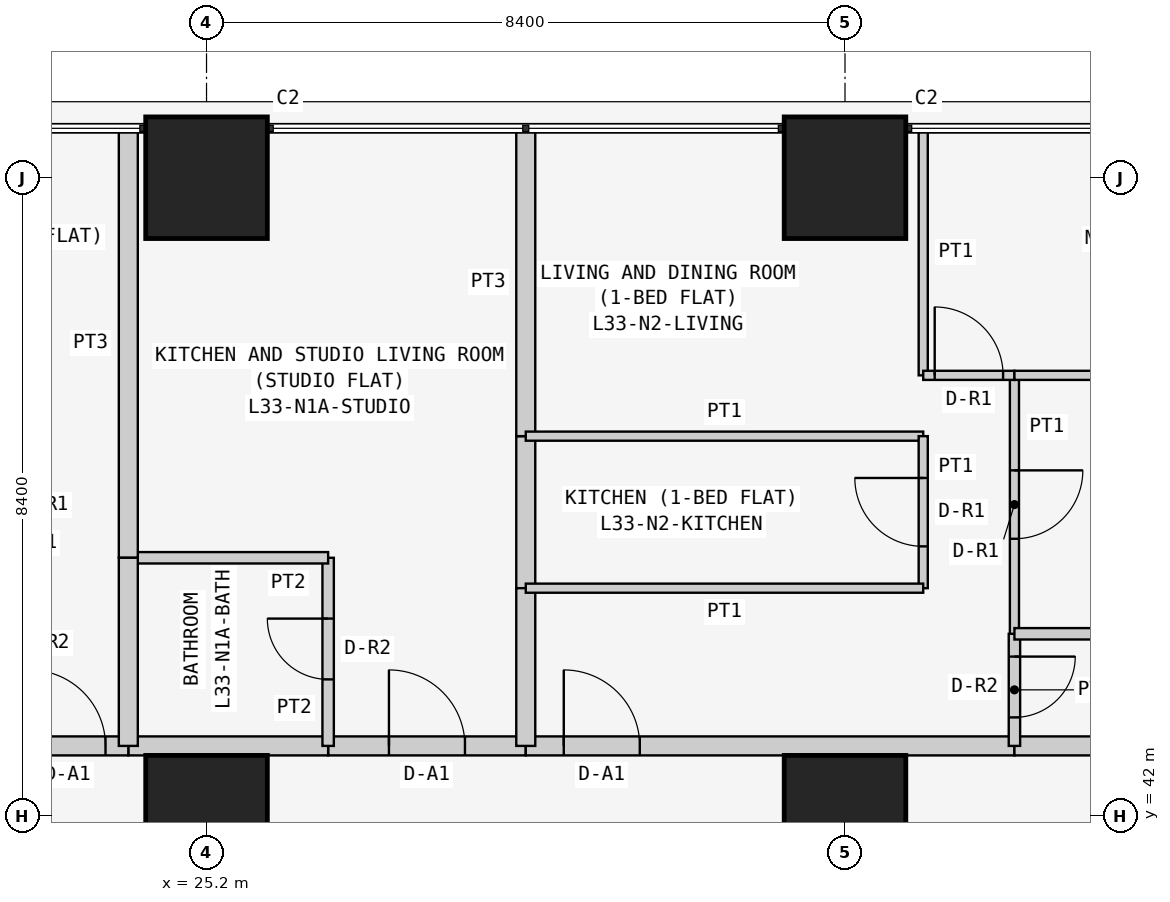
"""IFC4 building model, lengths in metres.
Left out: names, types, materials, properties, quantities, classifications, styles, units other than length and angle.
Written with IfcOpenShell. Run it as: python <this file> out.ifc"""

import sys

from ifc_helpers import new_model, si_unit, direction, frame, frame_2d, origin, origin_2d, place, context, subcontext, project, spatial, rectangle, extrude, element, fill, save


model = new_model("IFC4")
c1 = context("Model", 3, precision=1e-05, world=origin(), true_north=direction((0.0, 1.0)))
c2 = subcontext(c1, "Body", "Model", "MODEL_VIEW")
j1 = project(units=[si_unit("LENGTHUNIT", "METRE"), si_unit("PLANEANGLEUNIT", "RADIAN")], contexts=[c1])
p1 = place(None, origin())
s1 = spatial("IfcSite", under=j1, at=p1, CompositionType="ELEMENT")
p2 = place(p1, origin())
s2 = spatial("IfcBuilding", under=s1, at=p2, CompositionType="ELEMENT")
p3 = place(p2, frame((0.0, 0.0, 130.5)))
s3 = spatial("IfcBuildingStorey", under=s2, at=p3, CompositionType="ELEMENT", Elevation=130.5)
for number, where, z_axis, x_axis in (
    (1, (25.2, 42.0, 0.0), (0.0, 0.0, 1.0), (1.0, 0.0, 0.0)),
    (2, (25.2, 50.4, 0.0), (0.0, 0.0, 1.0), (1.0, 0.0, 0.0)),
    (3, (33.6, 42.0, 0.0), (0.0, 0.0, 1.0), (1.0, 0.0, 0.0)),
    (4, (33.6, 50.4, 0.0), (0.0, 0.0, 1.0), (1.0, 0.0, 0.0)),
):
    element("IfcColumn", number, at=place(p3, frame(where, z_axis=z_axis, x_axis=x_axis)), inside=s3, PredefinedType="COLUMN", context=c2, shape_type="SweptSolid", body=[
        extrude(rectangle(XDim=1.6, YDim=1.6, at=origin_2d()), origin(), (0.0, 0.0, 1.0), 3.6),
    ])
p4 = place(p3, frame((26.8, 42.925, 0.0), z_axis=(0.0, 0.0, 1.0), x_axis=(1.0, 0.0, 0.0)))
e5 = element("IfcWall", 5, at=p4, inside=s3, PredefinedType="PARTITIONING", context=c2, shape_type="SweptSolid", body=[
    extrude(rectangle(XDim=2.6, YDim=0.25, at=frame_2d((1.3, 0.0))), origin(), (0.0, 0.0, 1.0), 3.45),
])
p5 = place(p4, frame((0.8, 0.0, 0.0)))
e6 = element("IfcOpeningElement", 6, at=p5, cuts=e5, PredefinedType="OPENING", context=c2, shape_type="SweptSolid", body=[
    extrude(rectangle(XDim=1.0, YDim=2.1, at=frame_2d((0.5, 1.05))), frame((0.0, 0.135, 0.0), z_axis=(0.0, -1.0, 0.0), x_axis=(1.0, 0.0, 0.0)), (0.0, 0.0, 1.0), 0.27),
])
p6 = place(p3, frame((24.171, 42.925, 0.0), z_axis=(0.0, 0.0, 1.0), x_axis=(1.0, 0.0, 0.0)))
e7 = element("IfcWall", 7, at=p6, inside=s3, PredefinedType="PARTITIONING", context=c2, shape_type="SweptSolid", body=[
    extrude(rectangle(XDim=2.629, YDim=0.25, at=frame_2d((1.314, 0.0))), origin(), (0.0, 0.0, 1.0), 3.45),
])
p7 = place(p3, frame((22.571, 42.925, 0.0), z_axis=(0.0, 0.0, 1.0), x_axis=(1.0, 0.0, 0.0)))
e8 = element("IfcWall", 8, at=p7, inside=s3, PredefinedType="PARTITIONING", context=c2, shape_type="SweptSolid", body=[
    extrude(rectangle(XDim=1.6, YDim=0.25, at=frame_2d((0.8, 0.0))), origin(), (0.0, 0.0, 1.0), 3.45),
])
p8 = place(p7, frame((0.3, 0.0, 0.0)))
e9 = element("IfcOpeningElement", 9, at=p8, cuts=e8, PredefinedType="OPENING", context=c2, shape_type="SweptSolid", body=[
    extrude(rectangle(XDim=1.0, YDim=2.1, at=frame_2d((0.5, 1.05))), frame((0.0, 0.135, 0.0), z_axis=(0.0, -1.0, 0.0), x_axis=(1.0, 0.0, 0.0)), (0.0, 0.0, 1.0), 0.27),
])
p9 = place(p3, frame((29.4, 42.925, 0.0), z_axis=(0.0, 0.0, 1.0), x_axis=(1.0, 0.0, 0.0)))
e10 = element("IfcWall", 10, at=p9, inside=s3, PredefinedType="PARTITIONING", context=c2, shape_type="SweptSolid", body=[
    extrude(rectangle(XDim=6.429, YDim=0.25, at=frame_2d((3.215, 0.0))), origin(), (0.0, 0.0, 1.0), 3.45),
])
p10 = place(p9, frame((0.5, 0.0, 0.0)))
e11 = element("IfcOpeningElement", 11, at=p10, cuts=e10, PredefinedType="OPENING", context=c2, shape_type="SweptSolid", body=[
    extrude(rectangle(XDim=1.0, YDim=2.1, at=frame_2d((0.5, 1.05))), frame((0.0, 0.135, 0.0), z_axis=(0.0, -1.0, 0.0), x_axis=(1.0, 0.0, 0.0)), (0.0, 0.0, 1.0), 0.27),
])
p11 = place(p3, frame((35.829, 42.925, 0.0), z_axis=(0.0, 0.0, 1.0), x_axis=(1.0, 0.0, 0.0)))
e12 = element("IfcWall", 12, at=p11, inside=s3, PredefinedType="PARTITIONING", context=c2, shape_type="SweptSolid", body=[
    extrude(rectangle(XDim=6.871, YDim=0.25, at=frame_2d((3.436, 0.0))), origin(), (0.0, 0.0, 1.0), 3.45),
])
p12 = place(p3, frame((26.8, 42.925, 0.0), z_axis=(0.0, 0.0, 1.0), x_axis=(0.0, 1.0, 0.0)))
e13 = element("IfcWall", 13, at=p12, inside=s3, PredefinedType="PARTITIONING", context=c2, shape_type="SweptSolid", body=[
    extrude(rectangle(XDim=2.475, YDim=0.15, at=frame_2d((1.237, 0.0))), origin(), (0.0, 0.0, 1.0), 3.45),
])
p13 = place(p12, frame((0.875, 0.0, 0.0)))
e14 = element("IfcOpeningElement", 14, at=p13, cuts=e13, PredefinedType="OPENING", context=c2, shape_type="SweptSolid", body=[
    extrude(rectangle(XDim=0.8, YDim=2.1, at=frame_2d((0.4, 1.05))), frame((0.0, 0.085, 0.0), z_axis=(0.0, -1.0, 0.0), x_axis=(1.0, 0.0, 0.0)), (0.0, 0.0, 1.0), 0.17),
])
p14 = place(p3, frame((26.8, 45.4, 0.0), z_axis=(0.0, 0.0, 1.0), x_axis=(-1.0, 0.0, 0.0)))
e15 = element("IfcWall", 15, at=p14, inside=s3, PredefinedType="PARTITIONING", context=c2, shape_type="SweptSolid", body=[
    extrude(rectangle(XDim=2.629, YDim=0.15, at=frame_2d((1.314, 0.0))), origin(), (0.0, 0.0, 1.0), 3.45),
])
p15 = place(p3, frame((24.171, 45.4, 0.0), z_axis=(0.0, 0.0, 1.0), x_axis=(0.0, 1.0, 0.0)))
e16 = element("IfcWall", 16, at=p15, inside=s3, PredefinedType="PARTITIONING", context=c2, shape_type="SweptSolid", body=[
    extrude(rectangle(XDim=5.65, YDim=0.25, at=frame_2d((2.825, 0.0))), origin(), (0.0, 0.0, 1.0), 3.45),
])
p16 = place(p3, frame((29.4, 47.0, 0.0), z_axis=(0.0, 0.0, 1.0), x_axis=(0.0, -1.0, 0.0)))
e17 = element("IfcWall", 17, at=p16, inside=s3, PredefinedType="PARTITIONING", context=c2, shape_type="SweptSolid", body=[
    extrude(rectangle(XDim=2.0, YDim=0.25, at=frame_2d((1.0, 0.0))), origin(), (0.0, 0.0, 1.0), 2.848),
])
p17 = place(p3, frame((29.4, 45.0, 0.0), z_axis=(0.0, 0.0, 1.0), x_axis=(0.0, -1.0, 0.0)))
e18 = element("IfcWall", 18, at=p17, inside=s3, PredefinedType="PARTITIONING", context=c2, shape_type="SweptSolid", body=[
    extrude(rectangle(XDim=2.075, YDim=0.25, at=frame_2d((1.038, 0.0))), origin(), (0.0, 0.0, 1.0), 2.848),
])
p18 = place(p3, frame((29.4, 51.05, 0.0), z_axis=(0.0, 0.0, 1.0), x_axis=(0.0, -1.0, 0.0)))
e19 = element("IfcWall", 19, at=p18, inside=s3, PredefinedType="PARTITIONING", context=c2, shape_type="SweptSolid", body=[
    extrude(rectangle(XDim=4.05, YDim=0.25, at=frame_2d((2.025, 0.0))), origin(), (0.0, 0.0, 1.0), 2.848),
])
p19 = place(p3, frame((24.171, 45.4, 0.0), z_axis=(0.0, 0.0, 1.0), x_axis=(0.0, -1.0, 0.0)))
e20 = element("IfcWall", 20, at=p19, inside=s3, PredefinedType="PARTITIONING", context=c2, shape_type="SweptSolid", body=[
    extrude(rectangle(XDim=2.475, YDim=0.25, at=frame_2d((1.237, 0.0))), origin(), (0.0, 0.0, 1.0), 3.45),
])
p20 = place(p3, frame((29.4, 47.0, 0.0), z_axis=(0.0, 0.0, 1.0), x_axis=(1.0, 0.0, 0.0)))
e21 = element("IfcWall", 21, at=p20, inside=s3, PredefinedType="PARTITIONING", context=c2, shape_type="SweptSolid", body=[
    extrude(rectangle(XDim=5.229, YDim=0.12, at=frame_2d((2.615, 0.0))), origin(), (0.0, 0.0, 1.0), 3.45),
])
p21 = place(p3, frame((34.629, 47.0, 0.0), z_axis=(0.0, 0.0, 1.0), x_axis=(0.0, -1.0, 0.0)))
e22 = element("IfcWall", 22, at=p21, inside=s3, PredefinedType="PARTITIONING", context=c2, shape_type="SweptSolid", body=[
    extrude(rectangle(XDim=2.0, YDim=0.12, at=frame_2d((1.0, 0.0))), origin(), (0.0, 0.0, 1.0), 3.45),
])
p22 = place(p21, frame((0.55, 0.0, 0.0)))
e23 = element("IfcOpeningElement", 23, at=p22, cuts=e22, PredefinedType="OPENING", context=c2, shape_type="SweptSolid", body=[
    extrude(rectangle(XDim=0.9, YDim=2.1, at=frame_2d((0.45, 1.05))), frame((0.0, 0.07, 0.0), z_axis=(0.0, -1.0, 0.0), x_axis=(1.0, 0.0, 0.0)), (0.0, 0.0, 1.0), 0.14),
])
p23 = place(p3, frame((34.629, 45.0, 0.0), z_axis=(0.0, 0.0, 1.0), x_axis=(-1.0, 0.0, 0.0)))
e24 = element("IfcWall", 24, at=p23, inside=s3, PredefinedType="PARTITIONING", context=c2, shape_type="SweptSolid", body=[
    extrude(rectangle(XDim=5.229, YDim=0.12, at=frame_2d((2.615, 0.0))), origin(), (0.0, 0.0, 1.0), 3.45),
])
p24 = place(p3, frame((35.829, 44.4, 0.0), z_axis=(0.0, 0.0, 1.0), x_axis=(0.0, -1.0, 0.0)))
e25 = element("IfcWall", 25, at=p24, inside=s3, PredefinedType="PARTITIONING", context=c2, shape_type="SweptSolid", body=[
    extrude(rectangle(XDim=1.475, YDim=0.15, at=frame_2d((0.737, 0.0))), origin(), (0.0, 0.0, 1.0), 3.45),
])
p25 = place(p24, frame((0.3, 0.0, 0.0)))
e26 = element("IfcOpeningElement", 26, at=p25, cuts=e25, PredefinedType="OPENING", context=c2, shape_type="SweptSolid", body=[
    extrude(rectangle(XDim=0.8, YDim=2.1, at=frame_2d((0.4, 1.05))), frame((0.0, 0.085, 0.0), z_axis=(0.0, -1.0, 0.0), x_axis=(1.0, 0.0, 0.0)), (0.0, 0.0, 1.0), 0.17),
])
p26 = place(p3, frame((35.829, 47.8, 0.0), z_axis=(0.0, 0.0, 1.0), x_axis=(0.0, -1.0, 0.0)))
e27 = element("IfcWall", 27, at=p26, inside=s3, PredefinedType="PARTITIONING", context=c2, shape_type="SweptSolid", body=[
    extrude(rectangle(XDim=3.4, YDim=0.12, at=frame_2d((1.7, 0.0))), origin(), (0.0, 0.0, 1.0), 3.45),
])
p27 = place(p26, frame((1.25, 0.0, 0.0)))
e28 = element("IfcOpeningElement", 28, at=p27, cuts=e27, PredefinedType="OPENING", context=c2, shape_type="SweptSolid", body=[
    extrude(rectangle(XDim=0.9, YDim=2.1, at=frame_2d((0.45, 1.05))), frame((0.0, 0.07, 0.0), z_axis=(0.0, -1.0, 0.0), x_axis=(1.0, 0.0, 0.0)), (0.0, 0.0, 1.0), 0.14),
])
p28 = place(p3, frame((34.629, 51.05, 0.0), z_axis=(0.0, 0.0, 1.0), x_axis=(0.0, -1.0, 0.0)))
e29 = element("IfcWall", 29, at=p28, inside=s3, PredefinedType="PARTITIONING", context=c2, shape_type="SweptSolid", body=[
    extrude(rectangle(XDim=3.25, YDim=0.12, at=frame_2d((1.625, 0.0))), origin(), (0.0, 0.0, 1.0), 3.45),
])
p29 = place(p3, frame((34.629, 47.8, 0.0), z_axis=(0.0, 0.0, 1.0), x_axis=(1.0, 0.0, 0.0)))
e30 = element("IfcWall", 30, at=p29, inside=s3, PredefinedType="PARTITIONING", context=c2, shape_type="SweptSolid", body=[
    extrude(rectangle(XDim=1.2, YDim=0.12, at=frame_2d((0.6, 0.0))), origin(), (0.0, 0.0, 1.0), 3.45),
])
p30 = place(p29, frame((0.151, 0.0, 0.0)))
e31 = element("IfcOpeningElement", 31, at=p30, cuts=e30, PredefinedType="OPENING", context=c2, shape_type="SweptSolid", body=[
    extrude(rectangle(XDim=0.9, YDim=2.1, at=frame_2d((0.45, 1.05))), frame((0.0, 0.07, 0.0), z_axis=(0.0, -1.0, 0.0), x_axis=(1.0, 0.0, 0.0)), (0.0, 0.0, 1.0), 0.14),
])
p31 = place(p3, frame((35.829, 44.4, 0.0), z_axis=(0.0, 0.0, 1.0), x_axis=(1.0, 0.0, 0.0)))
e32 = element("IfcWall", 32, at=p31, inside=s3, PredefinedType="PARTITIONING", context=c2, shape_type="SweptSolid", body=[
    extrude(rectangle(XDim=6.871, YDim=0.15, at=frame_2d((3.436, 0.0))), origin(), (0.0, 0.0, 1.0), 3.45),
])
p32 = place(p3, frame((35.829, 47.8, 0.0), z_axis=(0.0, 0.0, 1.0), x_axis=(1.0, 0.0, 0.0)))
e33 = element("IfcWall", 33, at=p32, inside=s3, PredefinedType="PARTITIONING", context=c2, shape_type="SweptSolid", body=[
    extrude(rectangle(XDim=6.871, YDim=0.12, at=frame_2d((3.436, 0.0))), origin(), (0.0, 0.0, 1.0), 3.45),
])
p33 = place(p5, origin())
e34 = element("IfcDoor", 34, at=p33, inside=s3, OperationType="SINGLE_SWING_LEFT", PredefinedType="DOOR", context=c2, shape_type="SweptSolid", body=[
    extrude(rectangle(XDim=1.0, YDim=2.1, at=frame_2d((0.5, 1.05))), frame((0.0, 0.025, 0.0), z_axis=(0.0, -1.0, 0.0), x_axis=(1.0, 0.0, 0.0)), (0.0, 0.0, 1.0), 0.05),
])
fill(e6, e34)
p34 = place(p13, origin())
e35 = element("IfcDoor", 35, at=p34, inside=s3, OperationType="SINGLE_SWING_RIGHT", PredefinedType="DOOR", context=c2, shape_type="SweptSolid", body=[
    extrude(rectangle(XDim=0.8, YDim=2.1, at=frame_2d((0.4, 1.05))), frame((0.0, 0.025, 0.0), z_axis=(0.0, -1.0, 0.0), x_axis=(1.0, 0.0, 0.0)), (0.0, 0.0, 1.0), 0.05),
])
fill(e14, e35)
p35 = place(p8, origin())
e36 = element("IfcDoor", 36, at=p35, inside=s3, OperationType="SINGLE_SWING_LEFT", PredefinedType="DOOR", context=c2, shape_type="SweptSolid", body=[
    extrude(rectangle(XDim=1.0, YDim=2.1, at=frame_2d((0.5, 1.05))), frame((0.0, 0.025, 0.0), z_axis=(0.0, -1.0, 0.0), x_axis=(1.0, 0.0, 0.0)), (0.0, 0.0, 1.0), 0.05),
])
fill(e9, e36)
p36 = place(p10, origin())
e37 = element("IfcDoor", 37, at=p36, inside=s3, OperationType="SINGLE_SWING_LEFT", PredefinedType="DOOR", context=c2, shape_type="SweptSolid", body=[
    extrude(rectangle(XDim=1.0, YDim=2.1, at=frame_2d((0.5, 1.05))), frame((0.0, 0.025, 0.0), z_axis=(0.0, -1.0, 0.0), x_axis=(1.0, 0.0, 0.0)), (0.0, 0.0, 1.0), 0.05),
])
fill(e11, e37)
p37 = place(p22, frame((0.9, 0.0, 0.0), z_axis=(0.0, 0.0, 1.0), x_axis=(-1.0, 0.0, 0.0)))
e38 = element("IfcDoor", 38, at=p37, inside=s3, OperationType="SINGLE_SWING_RIGHT", PredefinedType="DOOR", context=c2, shape_type="SweptSolid", body=[
    extrude(rectangle(XDim=0.9, YDim=2.1, at=frame_2d((0.45, 1.05))), frame((0.0, 0.025, 0.0), z_axis=(0.0, -1.0, 0.0), x_axis=(1.0, 0.0, 0.0)), (0.0, 0.0, 1.0), 0.05),
])
fill(e23, e38)
p38 = place(p25, origin())
e39 = element("IfcDoor", 39, at=p38, inside=s3, OperationType="SINGLE_SWING_LEFT", PredefinedType="DOOR", context=c2, shape_type="SweptSolid", body=[
    extrude(rectangle(XDim=0.8, YDim=2.1, at=frame_2d((0.4, 1.05))), frame((0.0, 0.025, 0.0), z_axis=(0.0, -1.0, 0.0), x_axis=(1.0, 0.0, 0.0)), (0.0, 0.0, 1.0), 0.05),
])
fill(e26, e39)
p39 = place(p27, origin())
e40 = element("IfcDoor", 40, at=p39, inside=s3, OperationType="SINGLE_SWING_LEFT", PredefinedType="DOOR", context=c2, shape_type="SweptSolid", body=[
    extrude(rectangle(XDim=0.9, YDim=2.1, at=frame_2d((0.45, 1.05))), frame((0.0, 0.025, 0.0), z_axis=(0.0, -1.0, 0.0), x_axis=(1.0, 0.0, 0.0)), (0.0, 0.0, 1.0), 0.05),
])
fill(e28, e40)
p40 = place(p30, origin())
e41 = element("IfcDoor", 41, at=p40, inside=s3, OperationType="SINGLE_SWING_LEFT", PredefinedType="DOOR", context=c2, shape_type="SweptSolid", body=[
    extrude(rectangle(XDim=0.9, YDim=2.1, at=frame_2d((0.45, 1.05))), frame((0.0, 0.025, 0.0), z_axis=(0.0, -1.0, 0.0), x_axis=(1.0, 0.0, 0.0)), (0.0, 0.0, 1.0), 0.05),
])
fill(e31, e41)
save(model, sys.argv[1])
